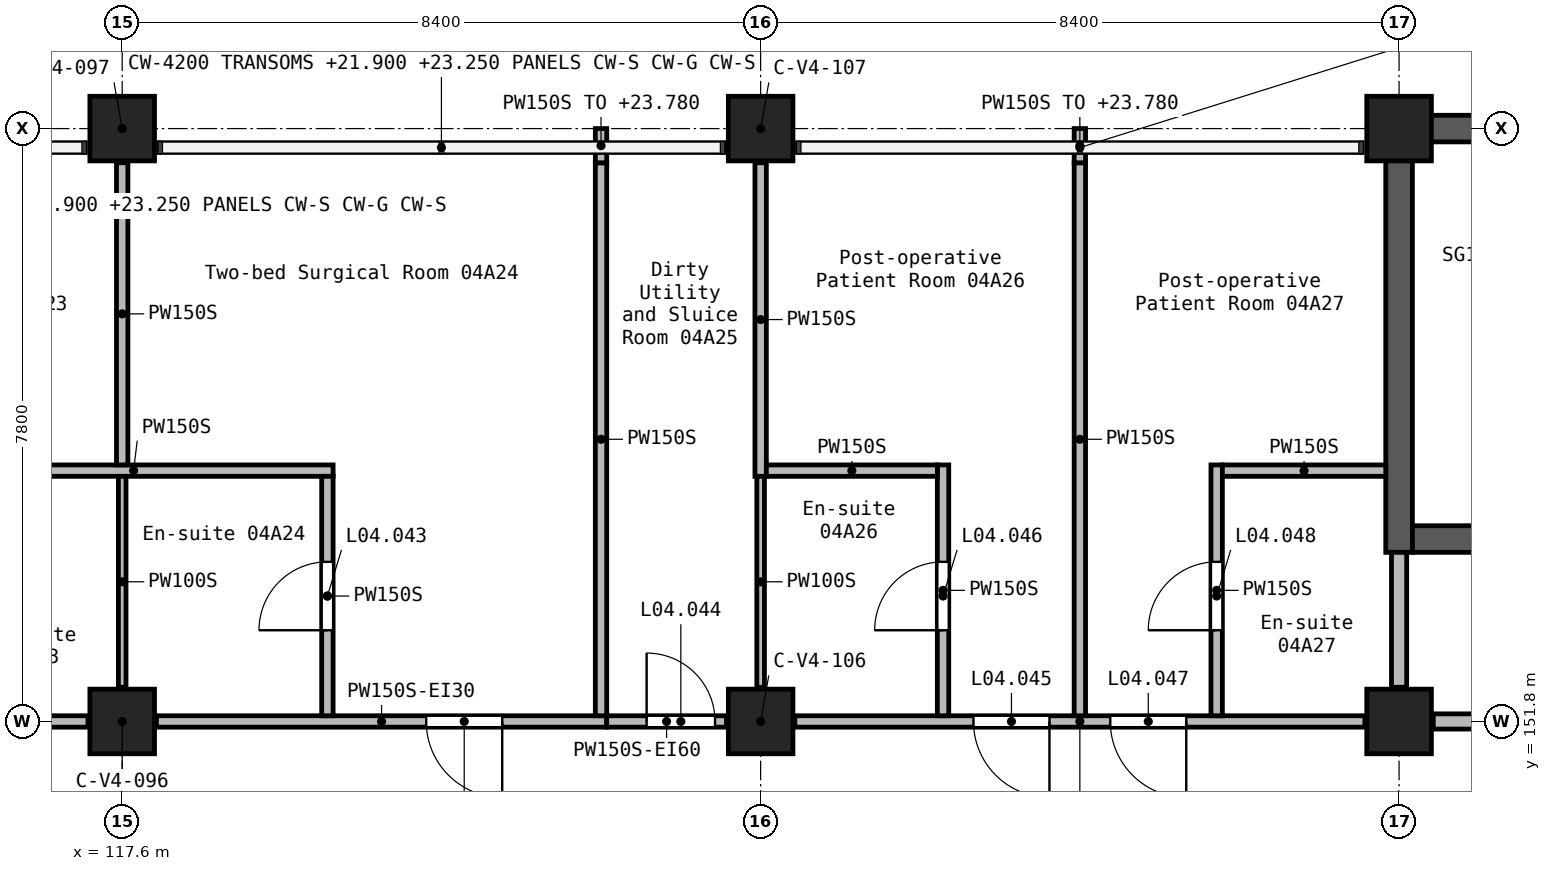
"""IFC4 building model, lengths in metres.
Left out: names, types, materials, properties, quantities, classifications, styles, units other than length and angle.
Written with IfcOpenShell. Run it as: python <this file> out.ifc"""

import sys

from ifc_helpers import new_model, si_unit, direction, frame, frame_2d, origin, origin_2d, place, context, subcontext, project, spatial, rectangle, extrude, element, fill, save


model = new_model("IFC4")
c1 = context("Model", 3, precision=1e-05, world=origin(), true_north=direction((0.0, 1.0)))
c2 = subcontext(c1, "Body", "Model", "MODEL_VIEW")
j1 = project(units=[si_unit("LENGTHUNIT", "METRE"), si_unit("PLANEANGLEUNIT", "RADIAN")], contexts=[c1])
p1 = place(None, origin())
s1 = spatial("IfcSite", under=j1, at=p1, CompositionType="ELEMENT")
p2 = place(p1, origin())
s2 = spatial("IfcBuilding", under=s1, at=p2, CompositionType="ELEMENT")
p3 = place(p2, frame((0.0, 0.0, 21.0)))
s3 = spatial("IfcBuildingStorey", under=s2, at=p3, CompositionType="ELEMENT", Elevation=21.0)
for number, where, z_axis, x_axis in (
    (1, (117.6, 151.8, 0.0), (0.0, 0.0, 1.0), (1.0, 0.0, 0.0)),
    (2, (117.6, 159.6, 0.0), (0.0, 0.0, 1.0), (1.0, 0.0, 0.0)),
    (3, (126.0, 151.8, 0.0), (0.0, 0.0, 1.0), (1.0, 0.0, 0.0)),
    (4, (126.0, 159.6, 0.0), (0.0, 0.0, 1.0), (1.0, 0.0, 0.0)),
    (5, (134.4, 151.8, 0.0), (0.0, 0.0, 1.0), (1.0, 0.0, 0.0)),
    (6, (134.4, 159.6, 0.0), (0.0, 0.0, 1.0), (1.0, 0.0, 0.0)),
):
    element("IfcColumn", number, at=place(p3, frame(where, z_axis=z_axis, x_axis=x_axis)), inside=s3, PredefinedType="COLUMN", context=c2, shape_type="SweptSolid", body=[
        extrude(rectangle(XDim=0.85, YDim=0.85, at=origin_2d()), origin(), (0.0, 0.0, 1.0), 3.9),
    ])
p4 = place(p3, frame((134.225, 159.6, 0.0), z_axis=(0.0, 0.0, 1.0), x_axis=(1.0, 0.0, 0.0)))
e7 = element("IfcWall", 7, at=p4, inside=s3, PredefinedType="SHEAR", context=c2, shape_type="SweptSolid", body=[
    extrude(rectangle(XDim=8.4, YDim=0.35, at=frame_2d((4.2, 0.0))), origin(), (0.0, 0.0, 1.0), 3.9),
])
p5 = place(p3, frame((134.4, 154.025, 0.0), z_axis=(0.0, 0.0, 1.0), x_axis=(0.0, 1.0, 0.0)))
e8 = element("IfcWall", 8, at=p5, inside=s3, PredefinedType="SHEAR", context=c2, shape_type="SweptSolid", body=[
    extrude(rectangle(XDim=5.4, YDim=0.35, at=frame_2d((2.7, 0.0))), origin(), (0.0, 0.0, 1.0), 3.9),
])
p6 = place(p3, frame((134.575, 154.2, 0.0), z_axis=(0.0, 0.0, 1.0), x_axis=(1.0, 0.0, 0.0)))
e9 = element("IfcWall", 9, at=p6, inside=s3, PredefinedType="SHEAR", context=c2, shape_type="SweptSolid", body=[
    extrude(rectangle(XDim=8.05, YDim=0.35, at=frame_2d((4.025, 0.0))), origin(), (0.0, 0.0, 1.0), 3.9),
])
p7 = place(p6, frame((6.525, 0.0, 0.0)))
e10 = element("IfcOpeningElement", 10, at=p7, cuts=e9, PredefinedType="OPENING", context=c2, shape_type="SweptSolid", body=[
    extrude(rectangle(XDim=1.1, YDim=2.1, at=frame_2d((0.55, 1.05))), frame((0.0, 0.185, 0.0), z_axis=(0.0, -1.0, 0.0), x_axis=(1.0, 0.0, 0.0)), (0.0, 0.0, 1.0), 0.37),
])
p8 = place(p3, frame((134.85, 151.8, 0.0), z_axis=(0.0, 0.0, 1.0), x_axis=(1.0, 0.0, 0.0)))
e11 = element("IfcWall", 11, at=p8, inside=s3, PredefinedType="SOLIDWALL", context=c2, shape_type="SweptSolid", body=[
    extrude(rectangle(XDim=7.5, YDim=0.2, at=frame_2d((3.75, 0.0))), origin(), (0.0, 0.0, 1.0), 3.6),
])
p9 = place(p8, frame((3.2, 0.0, 0.0)))
e12 = element("IfcOpeningElement", 12, at=p9, cuts=e11, PredefinedType="OPENING", context=c2, shape_type="SweptSolid", body=[
    extrude(rectangle(XDim=1.1, YDim=2.1, at=frame_2d((0.55, 1.05))), frame((0.0, 0.11, 0.0), z_axis=(0.0, -1.0, 0.0), x_axis=(1.0, 0.0, 0.0)), (0.0, 0.0, 1.0), 0.22),
])
p10 = place(p3, frame((134.4, 152.25, 0.0), z_axis=(0.0, 0.0, 1.0), x_axis=(0.0, 1.0, 0.0)))
e13 = element("IfcWall", 13, at=p10, inside=s3, PredefinedType="SOLIDWALL", context=c2, shape_type="SweptSolid", body=[
    extrude(rectangle(XDim=1.775, YDim=0.2, at=frame_2d((0.887, 0.0))), origin(), (0.0, 0.0, 1.0), 3.6),
])
p11 = place(p3, frame((123.975, 151.8, 0.0), z_axis=(0.0, 0.0, 1.0), x_axis=(-1.0, 0.0, 0.0)))
e14 = element("IfcWall", 14, at=p11, inside=s3, PredefinedType="PARTITIONING", context=c2, shape_type="SweptSolid", body=[
    extrude(rectangle(XDim=5.925, YDim=0.15, at=frame_2d((2.962, 0.0))), origin(), (0.0, 0.0, 1.0), 3.6),
])
p12 = place(p11, frame((1.375, 0.0, 0.0)))
e15 = element("IfcOpeningElement", 15, at=p12, cuts=e14, PredefinedType="OPENING", context=c2, shape_type="SweptSolid", body=[
    extrude(rectangle(XDim=1.0, YDim=2.1, at=frame_2d((0.5, 1.05))), frame((0.0, 0.085, 0.0), z_axis=(0.0, -1.0, 0.0), x_axis=(1.0, 0.0, 0.0)), (0.0, 0.0, 1.0), 0.17),
])
p13 = place(p3, frame((117.15, 151.8, 0.0), z_axis=(0.0, 0.0, 1.0), x_axis=(-1.0, 0.0, 0.0)))
e16 = element("IfcWall", 16, at=p13, inside=s3, PredefinedType="PARTITIONING", context=c2, shape_type="SweptSolid", body=[
    extrude(rectangle(XDim=3.825, YDim=0.15, at=frame_2d((1.913, 0.0))), origin(), (0.0, 0.0, 1.0), 3.6),
])
p14 = place(p13, frame((2.35, 0.0, 0.0)))
e17 = element("IfcOpeningElement", 17, at=p14, cuts=e16, PredefinedType="OPENING", context=c2, shape_type="SweptSolid", body=[
    extrude(rectangle(XDim=1.0, YDim=2.1, at=frame_2d((0.5, 1.05))), frame((0.0, 0.085, 0.0), z_axis=(0.0, -1.0, 0.0), x_axis=(1.0, 0.0, 0.0)), (0.0, 0.0, 1.0), 0.17),
])
p15 = place(p3, frame((133.95, 151.8, 0.0), z_axis=(0.0, 0.0, 1.0), x_axis=(-1.0, 0.0, 0.0)))
e18 = element("IfcWall", 18, at=p15, inside=s3, PredefinedType="PARTITIONING", context=c2, shape_type="SweptSolid", body=[
    extrude(rectangle(XDim=7.5, YDim=0.15, at=frame_2d((3.75, 0.0))), origin(), (0.0, 0.0, 1.0), 3.6),
])
p16 = place(p15, frame((4.15, 0.0, 0.0)))
e19 = element("IfcOpeningElement", 19, at=p16, cuts=e18, PredefinedType="OPENING", context=c2, shape_type="SweptSolid", body=[
    extrude(rectangle(XDim=1.0, YDim=2.1, at=frame_2d((0.5, 1.05))), frame((0.0, 0.085, 0.0), z_axis=(0.0, -1.0, 0.0), x_axis=(1.0, 0.0, 0.0)), (0.0, 0.0, 1.0), 0.17),
])
p17 = place(p15, frame((2.35, 0.0, 0.0)))
e20 = element("IfcOpeningElement", 20, at=p17, cuts=e18, PredefinedType="OPENING", context=c2, shape_type="SweptSolid", body=[
    extrude(rectangle(XDim=1.0, YDim=2.1, at=frame_2d((0.5, 1.05))), frame((0.0, 0.085, 0.0), z_axis=(0.0, -1.0, 0.0), x_axis=(1.0, 0.0, 0.0)), (0.0, 0.0, 1.0), 0.17),
])
p18 = place(p3, frame((123.975, 151.8, 0.0), z_axis=(0.0, 0.0, 1.0), x_axis=(1.0, 0.0, 0.0)))
e21 = element("IfcWall", 21, at=p18, inside=s3, PredefinedType="PARTITIONING", context=c2, shape_type="SweptSolid", body=[
    extrude(rectangle(XDim=1.575, YDim=0.15, at=frame_2d((0.788, 0.0))), origin(), (0.0, 0.0, 1.0), 3.6),
])
p19 = place(p18, frame((0.525, 0.0, 0.0)))
e22 = element("IfcOpeningElement", 22, at=p19, cuts=e21, PredefinedType="OPENING", context=c2, shape_type="SweptSolid", body=[
    extrude(rectangle(XDim=0.9, YDim=2.1, at=frame_2d((0.45, 1.05))), frame((0.0, 0.085, 0.0), z_axis=(0.0, -1.0, 0.0), x_axis=(1.0, 0.0, 0.0)), (0.0, 0.0, 1.0), 0.17),
])
p20 = place(p3, frame((123.9, 151.875, 0.0), z_axis=(0.0, 0.0, 1.0), x_axis=(0.0, 1.0, 0.0)))
e23 = element("IfcWall", 23, at=p20, inside=s3, PredefinedType="PARTITIONING", context=c2, shape_type="SweptSolid", body=[
    extrude(rectangle(XDim=7.275, YDim=0.15, at=frame_2d((3.637, 0.0))), origin(), (0.0, 0.0, 1.0), 3.6),
])
p21 = place(p3, frame((123.9, 159.15, 0.0), z_axis=(0.0, 0.0, 1.0), x_axis=(0.0, 1.0, 0.0)))
e24 = element("IfcWall", 24, at=p21, inside=s3, PredefinedType="PARTITIONING", context=c2, shape_type="SweptSolid", body=[
    extrude(rectangle(XDim=0.45, YDim=0.15, at=frame_2d((0.225, 0.0))), origin(), (0.0, 0.0, 1.0), 2.78),
])
p22 = place(p3, frame((130.2, 151.875, 0.0), z_axis=(0.0, 0.0, 1.0), x_axis=(0.0, 1.0, 0.0)))
e25 = element("IfcWall", 25, at=p22, inside=s3, PredefinedType="PARTITIONING", context=c2, shape_type="SweptSolid", body=[
    extrude(rectangle(XDim=7.275, YDim=0.15, at=frame_2d((3.637, 0.0))), origin(), (0.0, 0.0, 1.0), 3.6),
])
p23 = place(p3, frame((130.2, 159.15, 0.0), z_axis=(0.0, 0.0, 1.0), x_axis=(0.0, 1.0, 0.0)))
e26 = element("IfcWall", 26, at=p23, inside=s3, PredefinedType="PARTITIONING", context=c2, shape_type="SweptSolid", body=[
    extrude(rectangle(XDim=0.45, YDim=0.15, at=frame_2d((0.225, 0.0))), origin(), (0.0, 0.0, 1.0), 2.78),
])
p24 = place(p3, frame((115.125, 155.1, 0.0), z_axis=(0.0, 0.0, 1.0), x_axis=(1.0, 0.0, 0.0)))
e27 = element("IfcWall", 27, at=p24, inside=s3, PredefinedType="PARTITIONING", context=c2, shape_type="SweptSolid", body=[
    extrude(rectangle(XDim=5.25, YDim=0.15, at=frame_2d((2.625, 0.0))), origin(), (0.0, 0.0, 1.0), 3.6),
])
p25 = place(p3, frame((117.6, 155.175, 0.0), z_axis=(0.0, 0.0, 1.0), x_axis=(0.0, 1.0, 0.0)))
e28 = element("IfcWall", 28, at=p25, inside=s3, PredefinedType="PARTITIONING", context=c2, shape_type="SweptSolid", body=[
    extrude(rectangle(XDim=3.975, YDim=0.15, at=frame_2d((1.987, 0.0))), origin(), (0.0, 0.0, 1.0), 3.6),
])
p26 = place(p3, frame((126.0, 155.025, 0.0), z_axis=(0.0, 0.0, 1.0), x_axis=(0.0, 1.0, 0.0)))
e29 = element("IfcWall", 29, at=p26, inside=s3, PredefinedType="PARTITIONING", context=c2, shape_type="SweptSolid", body=[
    extrude(rectangle(XDim=4.125, YDim=0.15, at=frame_2d((2.062, 0.0))), origin(), (0.0, 0.0, 1.0), 3.6),
])
p27 = place(p3, frame((120.3, 151.875, 0.0), z_axis=(0.0, 0.0, 1.0), x_axis=(0.0, 1.0, 0.0)))
e30 = element("IfcWall", 30, at=p27, inside=s3, PredefinedType="PARTITIONING", context=c2, shape_type="SweptSolid", body=[
    extrude(rectangle(XDim=3.15, YDim=0.15, at=frame_2d((1.575, 0.0))), origin(), (0.0, 0.0, 1.0), 3.6),
])
p28 = place(p27, frame((1.125, 0.0, 0.0)))
e31 = element("IfcOpeningElement", 31, at=p28, cuts=e30, PredefinedType="OPENING", context=c2, shape_type="SweptSolid", body=[
    extrude(rectangle(XDim=0.9, YDim=2.1, at=frame_2d((0.45, 1.05))), frame((0.0, 0.085, 0.0), z_axis=(0.0, -1.0, 0.0), x_axis=(1.0, 0.0, 0.0)), (0.0, 0.0, 1.0), 0.17),
])
p29 = place(p3, frame((128.4, 151.875, 0.0), z_axis=(0.0, 0.0, 1.0), x_axis=(0.0, 1.0, 0.0)))
e32 = element("IfcWall", 32, at=p29, inside=s3, PredefinedType="PARTITIONING", context=c2, shape_type="SweptSolid", body=[
    extrude(rectangle(XDim=3.3, YDim=0.15, at=frame_2d((1.65, 0.0))), origin(), (0.0, 0.0, 1.0), 3.6),
])
p30 = place(p29, frame((1.125, 0.0, 0.0)))
e33 = element("IfcOpeningElement", 33, at=p30, cuts=e32, PredefinedType="OPENING", context=c2, shape_type="SweptSolid", body=[
    extrude(rectangle(XDim=0.9, YDim=2.1, at=frame_2d((0.45, 1.05))), frame((0.0, 0.085, 0.0), z_axis=(0.0, -1.0, 0.0), x_axis=(1.0, 0.0, 0.0)), (0.0, 0.0, 1.0), 0.17),
])
p31 = place(p3, frame((132.0, 151.875, 0.0), z_axis=(0.0, 0.0, 1.0), x_axis=(0.0, 1.0, 0.0)))
e34 = element("IfcWall", 34, at=p31, inside=s3, PredefinedType="PARTITIONING", context=c2, shape_type="SweptSolid", body=[
    extrude(rectangle(XDim=3.3, YDim=0.15, at=frame_2d((1.65, 0.0))), origin(), (0.0, 0.0, 1.0), 3.6),
])
p32 = place(p31, frame((1.125, 0.0, 0.0)))
e35 = element("IfcOpeningElement", 35, at=p32, cuts=e34, PredefinedType="OPENING", context=c2, shape_type="SweptSolid", body=[
    extrude(rectangle(XDim=0.9, YDim=2.1, at=frame_2d((0.45, 1.05))), frame((0.0, 0.085, 0.0), z_axis=(0.0, -1.0, 0.0), x_axis=(1.0, 0.0, 0.0)), (0.0, 0.0, 1.0), 0.17),
])
p33 = place(p3, frame((126.075, 155.1, 0.0), z_axis=(0.0, 0.0, 1.0), x_axis=(1.0, 0.0, 0.0)))
e36 = element("IfcWall", 36, at=p33, inside=s3, PredefinedType="PARTITIONING", context=c2, shape_type="SweptSolid", body=[
    extrude(rectangle(XDim=2.25, YDim=0.15, at=frame_2d((1.125, 0.0))), origin(), (0.0, 0.0, 1.0), 3.6),
])
p34 = place(p3, frame((132.075, 155.1, 0.0), z_axis=(0.0, 0.0, 1.0), x_axis=(1.0, 0.0, 0.0)))
e37 = element("IfcWall", 37, at=p34, inside=s3, PredefinedType="PARTITIONING", context=c2, shape_type="SweptSolid", body=[
    extrude(rectangle(XDim=2.15, YDim=0.15, at=frame_2d((1.075, 0.0))), origin(), (0.0, 0.0, 1.0), 3.6),
])
for number, where, z_axis, x_axis in (
    (38, (117.6, 152.25, 0.0), (0.0, 0.0, 1.0), (0.0, 1.0, 0.0)),
    (39, (126.0, 152.25, 0.0), (0.0, 0.0, 1.0), (0.0, 1.0, 0.0)),
):
    element("IfcWall", number, at=place(p3, frame(where, z_axis=z_axis, x_axis=x_axis)), inside=s3, PredefinedType="PARTITIONING", context=c2, shape_type="SweptSolid", body=[
        extrude(rectangle(XDim=2.775, YDim=0.1, at=frame_2d((1.387, 0.0))), origin(), (0.0, 0.0, 1.0), 3.6),
    ])
p35 = place(p12, frame((1.0, 0.0, 0.0), z_axis=(0.0, 0.0, 1.0), x_axis=(-1.0, 0.0, 0.0)))
e40 = element("IfcDoor", 40, at=p35, inside=s3, OperationType="SINGLE_SWING_RIGHT", PredefinedType="DOOR", context=c2, shape_type="SweptSolid", body=[
    extrude(rectangle(XDim=1.0, YDim=2.1, at=frame_2d((0.5, 1.05))), frame((0.0, 0.025, 0.0), z_axis=(0.0, -1.0, 0.0), x_axis=(1.0, 0.0, 0.0)), (0.0, 0.0, 1.0), 0.05),
])
fill(e15, e40)
p36 = place(p28, origin())
e41 = element("IfcDoor", 41, at=p36, inside=s3, OperationType="SINGLE_SWING_RIGHT", PredefinedType="DOOR", context=c2, shape_type="SweptSolid", body=[
    extrude(rectangle(XDim=0.9, YDim=2.1, at=frame_2d((0.45, 1.05))), frame((0.0, 0.025, 0.0), z_axis=(0.0, -1.0, 0.0), x_axis=(1.0, 0.0, 0.0)), (0.0, 0.0, 1.0), 0.05),
])
fill(e31, e41)
p37 = place(p19, origin())
e42 = element("IfcDoor", 42, at=p37, inside=s3, OperationType="SINGLE_SWING_RIGHT", PredefinedType="DOOR", context=c2, shape_type="SweptSolid", body=[
    extrude(rectangle(XDim=0.9, YDim=2.1, at=frame_2d((0.45, 1.05))), frame((0.0, 0.025, 0.0), z_axis=(0.0, -1.0, 0.0), x_axis=(1.0, 0.0, 0.0)), (0.0, 0.0, 1.0), 0.05),
])
fill(e22, e42)
p38 = place(p16, frame((1.0, 0.0, 0.0), z_axis=(0.0, 0.0, 1.0), x_axis=(-1.0, 0.0, 0.0)))
e43 = element("IfcDoor", 43, at=p38, inside=s3, OperationType="SINGLE_SWING_LEFT", PredefinedType="DOOR", context=c2, shape_type="SweptSolid", body=[
    extrude(rectangle(XDim=1.0, YDim=2.1, at=frame_2d((0.5, 1.05))), frame((0.0, 0.025, 0.0), z_axis=(0.0, -1.0, 0.0), x_axis=(1.0, 0.0, 0.0)), (0.0, 0.0, 1.0), 0.05),
])
fill(e19, e43)
p39 = place(p30, origin())
e44 = element("IfcDoor", 44, at=p39, inside=s3, OperationType="SINGLE_SWING_LEFT", PredefinedType="DOOR", context=c2, shape_type="SweptSolid", body=[
    extrude(rectangle(XDim=0.9, YDim=2.1, at=frame_2d((0.45, 1.05))), frame((0.0, 0.025, 0.0), z_axis=(0.0, -1.0, 0.0), x_axis=(1.0, 0.0, 0.0)), (0.0, 0.0, 1.0), 0.05),
])
fill(e33, e44)
p40 = place(p17, frame((1.0, 0.0, 0.0), z_axis=(0.0, 0.0, 1.0), x_axis=(-1.0, 0.0, 0.0)))
e45 = element("IfcDoor", 45, at=p40, inside=s3, OperationType="SINGLE_SWING_RIGHT", PredefinedType="DOOR", context=c2, shape_type="SweptSolid", body=[
    extrude(rectangle(XDim=1.0, YDim=2.1, at=frame_2d((0.5, 1.05))), frame((0.0, 0.025, 0.0), z_axis=(0.0, -1.0, 0.0), x_axis=(1.0, 0.0, 0.0)), (0.0, 0.0, 1.0), 0.05),
])
fill(e20, e45)
p41 = place(p32, frame((0.9, 0.0, 0.0), z_axis=(0.0, 0.0, 1.0), x_axis=(-1.0, 0.0, 0.0)))
e46 = element("IfcDoor", 46, at=p41, inside=s3, OperationType="SINGLE_SWING_RIGHT", PredefinedType="DOOR", context=c2, shape_type="SweptSolid", body=[
    extrude(rectangle(XDim=0.9, YDim=2.1, at=frame_2d((0.45, 1.05))), frame((0.0, 0.025, 0.0), z_axis=(0.0, -1.0, 0.0), x_axis=(1.0, 0.0, 0.0)), (0.0, 0.0, 1.0), 0.05),
])
fill(e35, e46)
save(model, sys.argv[1])
